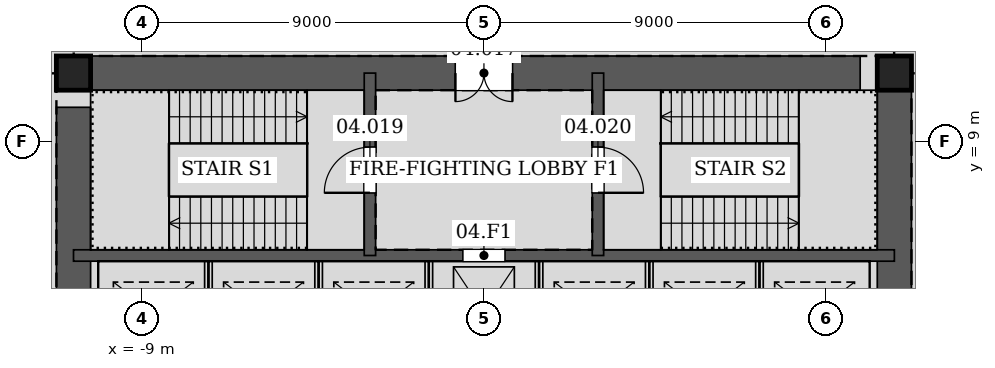
"""IFC4 building model, lengths in metres.
Left out: names, types, materials, properties, quantities, classifications, styles, units other than length and angle.
Written with IfcOpenShell. Run it as: python <this file> out.ifc"""

import sys

from ifc_helpers import new_model, si_unit, direction, frame, frame_2d, origin, origin_2d, place, context, subcontext, project, spatial, rectangle, hollow_rectangle, extrude, element, fill, save


model = new_model("IFC4")
c1 = context("Model", 3, precision=1e-05, world=origin(), true_north=direction((0.0, 1.0)))
c2 = subcontext(c1, "Body", "Model", "MODEL_VIEW")
j1 = project(units=[si_unit("LENGTHUNIT", "METRE"), si_unit("PLANEANGLEUNIT", "RADIAN")], contexts=[c1])
p1 = place(None, origin())
s1 = spatial("IfcSite", under=j1, at=p1, CompositionType="ELEMENT")
p2 = place(p1, origin())
s2 = spatial("IfcBuilding", under=s1, at=p2, CompositionType="ELEMENT")
p3 = place(p2, frame((0.0, 0.0, 24.0)))
s3 = spatial("IfcBuildingStorey", under=s2, at=p3, CompositionType="ELEMENT", Elevation=24.0)
for number, where, z_axis, x_axis in (
    (1, (10.8, 10.8, 0.0), (0.0, 0.0, 1.0), (1.0, 0.0, 0.0)),
    (2, (-10.8, 10.8, 0.0), (0.0, 0.0, 1.0), (1.0, 0.0, 0.0)),
):
    element("IfcColumn", number, at=place(p3, frame(where, z_axis=z_axis, x_axis=x_axis)), inside=s3, PredefinedType="COLUMN", context=c2, shape_type="SweptSolid", body=[
        extrude(hollow_rectangle(XDim=0.9, YDim=0.9, WallThickness=0.06, at=origin_2d()), origin(), (0.0, 0.0, 1.0), 4.8),
    ])
p4 = place(p3, frame((10.8, -10.8, 0.0), z_axis=(0.0, 0.0, 1.0), x_axis=(0.0, 1.0, 0.0)))
e3 = element("IfcWall", 3, at=p4, inside=s3, PredefinedType="SOLIDWALL", context=c2, shape_type="SweptSolid", body=[
    extrude(rectangle(XDim=21.6, YDim=0.9, at=frame_2d((10.8, 0.0))), origin(), (0.0, 0.0, 1.0), 4.8),
])
p5 = place(p4, frame((11.7, 0.0, 0.0)))
e4 = element("IfcOpeningElement", 4, at=p5, cuts=e3, PredefinedType="OPENING", context=c2, shape_type="SweptSolid", body=[
    extrude(rectangle(XDim=1.2, YDim=2.1, at=frame_2d((0.6, 1.05))), frame((0.0, 0.46, 0.0), z_axis=(0.0, -1.0, 0.0), x_axis=(1.0, 0.0, 0.0)), (0.0, 0.0, 1.0), 0.92),
])
p6 = place(p4, frame((8.7, 0.0, 0.0)))
e5 = element("IfcOpeningElement", 5, at=p6, cuts=e3, PredefinedType="OPENING", context=c2, shape_type="SweptSolid", body=[
    extrude(rectangle(XDim=1.2, YDim=2.1, at=frame_2d((0.6, 1.05))), frame((0.0, 0.46, 0.0), z_axis=(0.0, -1.0, 0.0), x_axis=(1.0, 0.0, 0.0)), (0.0, 0.0, 1.0), 0.92),
])
p7 = place(p3, frame((10.8, 10.8, 0.0), z_axis=(0.0, 0.0, 1.0), x_axis=(-1.0, 0.0, 0.0)))
e6 = element("IfcWall", 6, at=p7, inside=s3, PredefinedType="SOLIDWALL", context=c2, shape_type="SweptSolid", body=[
    extrude(rectangle(XDim=21.6, YDim=0.9, at=frame_2d((10.8, 0.0))), origin(), (0.0, 0.0, 1.0), 4.8),
])
p8 = place(p7, frame((10.05, 0.0, 0.0)))
e7 = element("IfcOpeningElement", 7, at=p8, cuts=e6, PredefinedType="OPENING", context=c2, shape_type="SweptSolid", body=[
    extrude(rectangle(XDim=1.5, YDim=2.1, at=frame_2d((0.75, 1.05))), frame((0.0, 0.46, 0.0), z_axis=(0.0, -1.0, 0.0), x_axis=(1.0, 0.0, 0.0)), (0.0, 0.0, 1.0), 0.92),
])
p9 = place(p3, frame((-10.8, 10.8, 0.0), z_axis=(0.0, 0.0, 1.0), x_axis=(0.0, -1.0, 0.0)))
e8 = element("IfcWall", 8, at=p9, inside=s3, PredefinedType="SOLIDWALL", context=c2, shape_type="SweptSolid", body=[
    extrude(rectangle(XDim=21.6, YDim=0.9, at=frame_2d((10.8, 0.0))), origin(), (0.0, 0.0, 1.0), 4.8),
])
p10 = place(p9, frame((8.7, 0.0, 0.0)))
e9 = element("IfcOpeningElement", 9, at=p10, cuts=e8, PredefinedType="OPENING", context=c2, shape_type="SweptSolid", body=[
    extrude(rectangle(XDim=1.2, YDim=2.1, at=frame_2d((0.6, 1.05))), frame((0.0, 0.46, 0.0), z_axis=(0.0, -1.0, 0.0), x_axis=(1.0, 0.0, 0.0)), (0.0, 0.0, 1.0), 0.92),
])
p11 = place(p9, frame((11.7, 0.0, 0.0)))
e10 = element("IfcOpeningElement", 10, at=p11, cuts=e8, PredefinedType="OPENING", context=c2, shape_type="SweptSolid", body=[
    extrude(rectangle(XDim=1.2, YDim=2.1, at=frame_2d((0.6, 1.05))), frame((0.0, 0.46, 0.0), z_axis=(0.0, -1.0, 0.0), x_axis=(1.0, 0.0, 0.0)), (0.0, 0.0, 1.0), 0.92),
])
p12 = place(p3, frame((-10.8, 6.0, 0.0), z_axis=(0.0, 0.0, 1.0), x_axis=(1.0, 0.0, 0.0)))
e11 = element("IfcWall", 11, at=p12, inside=s3, PredefinedType="SOLIDWALL", context=c2, shape_type="SweptSolid", body=[
    extrude(rectangle(XDim=21.6, YDim=0.3, at=frame_2d((10.8, 0.0))), origin(), (0.0, 0.0, 1.0), 4.8),
])
p13 = place(p12, frame((10.25, 0.0, 0.0)))
e12 = element("IfcOpeningElement", 12, at=p13, cuts=e11, PredefinedType="OPENING", context=c2, shape_type="SweptSolid", body=[
    extrude(rectangle(XDim=1.1, YDim=2.1, at=frame_2d((0.55, 1.05))), frame((0.0, 0.16, 0.0), z_axis=(0.0, -1.0, 0.0), x_axis=(1.0, 0.0, 0.0)), (0.0, 0.0, 1.0), 0.32),
])
p14 = place(p3, frame((-3.0, 6.0, 0.0), z_axis=(0.0, 0.0, 1.0), x_axis=(0.0, 1.0, 0.0)))
e13 = element("IfcWall", 13, at=p14, inside=s3, PredefinedType="SOLIDWALL", context=c2, shape_type="SweptSolid", body=[
    extrude(rectangle(XDim=4.8, YDim=0.3, at=frame_2d((2.4, 0.0))), origin(), (0.0, 0.0, 1.0), 4.8),
])
p15 = place(p14, frame((1.65, 0.0, 0.0)))
e14 = element("IfcOpeningElement", 14, at=p15, cuts=e13, PredefinedType="OPENING", context=c2, shape_type="SweptSolid", body=[
    extrude(rectangle(XDim=1.2, YDim=2.1, at=frame_2d((0.6, 1.05))), frame((0.0, 0.16, 0.0), z_axis=(0.0, -1.0, 0.0), x_axis=(1.0, 0.0, 0.0)), (0.0, 0.0, 1.0), 0.32),
])
p16 = place(p3, frame((3.0, 6.0, 0.0), z_axis=(0.0, 0.0, 1.0), x_axis=(0.0, 1.0, 0.0)))
e15 = element("IfcWall", 15, at=p16, inside=s3, PredefinedType="SOLIDWALL", context=c2, shape_type="SweptSolid", body=[
    extrude(rectangle(XDim=4.8, YDim=0.3, at=frame_2d((2.4, 0.0))), origin(), (0.0, 0.0, 1.0), 4.8),
])
p17 = place(p16, frame((1.65, 0.0, 0.0)))
e16 = element("IfcOpeningElement", 16, at=p17, cuts=e15, PredefinedType="OPENING", context=c2, shape_type="SweptSolid", body=[
    extrude(rectangle(XDim=1.2, YDim=2.1, at=frame_2d((0.6, 1.05))), frame((0.0, 0.16, 0.0), z_axis=(0.0, -1.0, 0.0), x_axis=(1.0, 0.0, 0.0)), (0.0, 0.0, 1.0), 0.32),
])
for number, where, z_axis, x_axis in (
    (17, (-7.25, 3.15, 0.0), (0.0, 0.0, 1.0), (0.0, 1.0, 0.0)),
    (18, (-4.35, 3.15, 0.0), (0.0, 0.0, 1.0), (0.0, 1.0, 0.0)),
    (19, (-1.45, 3.15, 0.0), (0.0, 0.0, 1.0), (0.0, 1.0, 0.0)),
    (20, (1.45, 3.15, 0.0), (0.0, 0.0, 1.0), (0.0, 1.0, 0.0)),
    (21, (4.35, 3.15, 0.0), (0.0, 0.0, 1.0), (0.0, 1.0, 0.0)),
    (22, (7.25, 3.15, 0.0), (0.0, 0.0, 1.0), (0.0, 1.0, 0.0)),
):
    element("IfcWall", number, at=place(p3, frame(where, z_axis=z_axis, x_axis=x_axis)), inside=s3, PredefinedType="PARTITIONING", context=c2, shape_type="SweptSolid", body=[
        extrude(rectangle(XDim=2.7, YDim=0.2, at=frame_2d((1.35, 0.0))), origin(), (0.0, 0.0, 1.0), 4.8),
    ])
p18 = place(p8, origin())
e23 = element("IfcDoor", 23, at=p18, inside=s3, OperationType="DOUBLE_DOOR_SINGLE_SWING", PredefinedType="DOOR", context=c2, shape_type="SweptSolid", body=[
    extrude(rectangle(XDim=1.5, YDim=2.1, at=frame_2d((0.75, 1.05))), frame((0.0, 0.025, 0.0), z_axis=(0.0, -1.0, 0.0), x_axis=(1.0, 0.0, 0.0)), (0.0, 0.0, 1.0), 0.05),
])
fill(e7, e23)
p19 = place(p15, origin())
e24 = element("IfcDoor", 24, at=p19, inside=s3, OperationType="SINGLE_SWING_LEFT", PredefinedType="DOOR", context=c2, shape_type="SweptSolid", body=[
    extrude(rectangle(XDim=1.2, YDim=2.1, at=frame_2d((0.6, 1.05))), frame((0.0, 0.025, 0.0), z_axis=(0.0, -1.0, 0.0), x_axis=(1.0, 0.0, 0.0)), (0.0, 0.0, 1.0), 0.05),
])
fill(e14, e24)
p20 = place(p17, frame((1.2, 0.0, 0.0), z_axis=(0.0, 0.0, 1.0), x_axis=(-1.0, 0.0, 0.0)))
e25 = element("IfcDoor", 25, at=p20, inside=s3, OperationType="SINGLE_SWING_RIGHT", PredefinedType="DOOR", context=c2, shape_type="SweptSolid", body=[
    extrude(rectangle(XDim=1.2, YDim=2.1, at=frame_2d((0.6, 1.05))), frame((0.0, 0.025, 0.0), z_axis=(0.0, -1.0, 0.0), x_axis=(1.0, 0.0, 0.0)), (0.0, 0.0, 1.0), 0.05),
])
fill(e16, e25)
p21 = place(p13, origin())
e26 = element("IfcDoor", 26, at=p21, inside=s3, OperationType="DOUBLE_DOOR_SLIDING", PredefinedType="DOOR", context=c2, shape_type="SweptSolid", body=[
    extrude(rectangle(XDim=1.1, YDim=2.1, at=frame_2d((0.55, 1.05))), frame((0.0, 0.025, 0.0), z_axis=(0.0, -1.0, 0.0), x_axis=(1.0, 0.0, 0.0)), (0.0, 0.0, 1.0), 0.05),
])
fill(e12, e26)
save(model, sys.argv[1])
